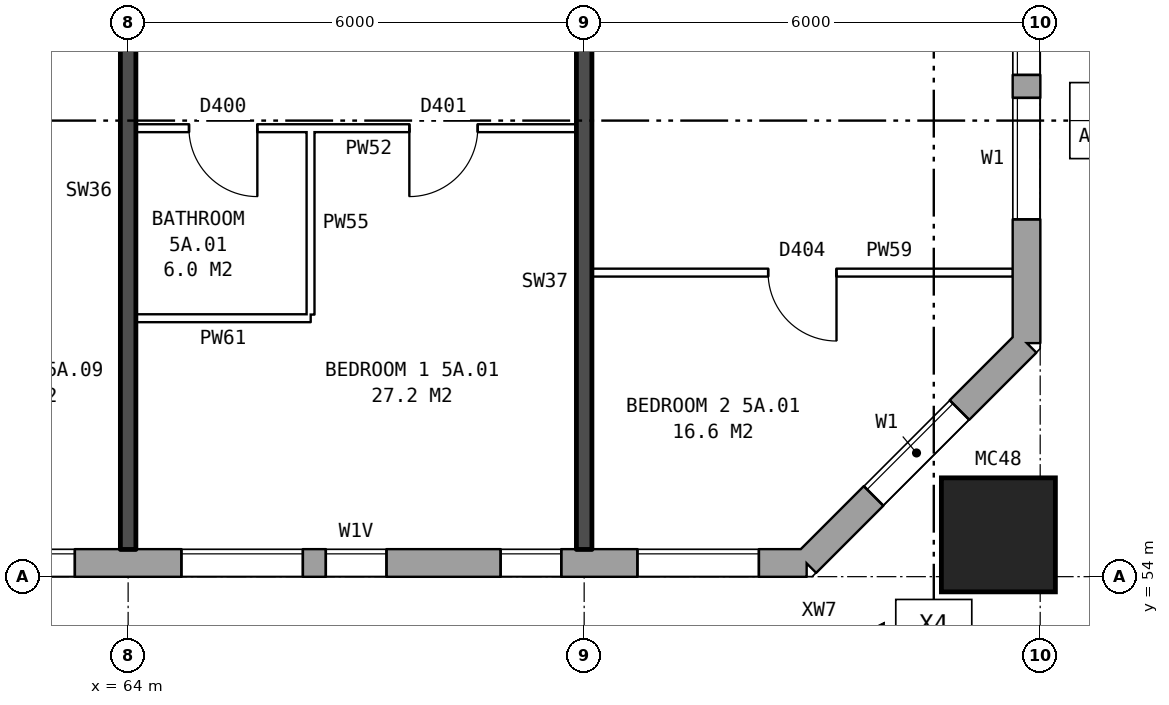
"""IFC4 building model, lengths in metres.
Left out: names, types, materials, properties, quantities, classifications, styles, units other than length and angle.
Written with IfcOpenShell. Run it as: python <this file> out.ifc"""

import sys

from ifc_helpers import new_model, si_unit, direction, frame, frame_2d, origin, origin_2d, place, context, subcontext, project, spatial, rectangle, hollow_rectangle, extrude, element, fill, save


model = new_model("IFC4")
c1 = context("Model", 3, precision=1e-05, world=origin(), true_north=direction((0.0, 1.0)))
c2 = subcontext(c1, "Body", "Model", "MODEL_VIEW")
j1 = project(units=[si_unit("LENGTHUNIT", "METRE"), si_unit("PLANEANGLEUNIT", "RADIAN")], contexts=[c1])
p1 = place(None, origin())
s1 = spatial("IfcSite", under=j1, at=p1, CompositionType="ELEMENT")
p2 = place(p1, origin())
s2 = spatial("IfcBuilding", under=s1, at=p2, CompositionType="ELEMENT")
p3 = place(p2, frame((0.0, 0.0, 22.6)))
s3 = spatial("IfcBuildingStorey", under=s2, at=p3, CompositionType="ELEMENT", Elevation=22.6)
p4 = place(p3, frame((75.45, 54.55, 0.0), z_axis=(0.0, 0.0, 1.0), x_axis=(1.0, 0.0, 0.0)))
e1 = element("IfcColumn", 1, at=p4, inside=s3, PredefinedType="COLUMN", context=c2, shape_type="SweptSolid", body=[
    extrude(hollow_rectangle(XDim=1.5, YDim=1.5, WallThickness=0.08, at=origin_2d()), origin(), (0.0, 0.0, 1.0), 3.1),
])
p5 = place(p3, frame((22.825, 54.18, 0.0), z_axis=(0.0, 0.0, 1.0), x_axis=(1.0, 0.0, 0.0)))
e2 = element("IfcWall", 2, at=p5, inside=s3, PredefinedType="STANDARD", context=c2, shape_type="SweptSolid", body=[
    extrude(rectangle(XDim=50.101, YDim=0.36, at=frame_2d((25.05, 0.0))), origin(), (0.0, 0.0, 1.0), 2.85),
])
p6 = place(p5, frame((0.3, 0.0, 0.8)))
e3 = element("IfcOpeningElement", 3, at=p6, cuts=e2, PredefinedType="OPENING", context=c2, shape_type="SweptSolid", body=[
    extrude(rectangle(XDim=1.4, YDim=1.8, at=frame_2d((0.7, 0.9))), frame((0.0, 0.19, 0.0), z_axis=(0.0, -1.0, 0.0), x_axis=(1.0, 0.0, 0.0)), (0.0, 0.0, 1.0), 0.38),
])
p7 = place(p5, frame((5.475, 0.0, 0.8)))
e4 = element("IfcOpeningElement", 4, at=p7, cuts=e2, PredefinedType="OPENING", context=c2, shape_type="SweptSolid", body=[
    extrude(rectangle(XDim=1.2, YDim=0.9, at=frame_2d((0.6, 0.45))), frame((0.0, 0.19, 0.0), z_axis=(0.0, -1.0, 0.0), x_axis=(1.0, 0.0, 0.0)), (0.0, 0.0, 1.0), 0.38),
])
p8 = place(p5, frame((8.875, 0.0, 0.8)))
e5 = element("IfcOpeningElement", 5, at=p8, cuts=e2, PredefinedType="OPENING", context=c2, shape_type="SweptSolid", body=[
    extrude(rectangle(XDim=1.6, YDim=1.8, at=frame_2d((0.8, 0.9))), frame((0.0, 0.19, 0.0), z_axis=(0.0, -1.0, 0.0), x_axis=(1.0, 0.0, 0.0)), (0.0, 0.0, 1.0), 0.38),
])
p9 = place(p5, frame((11.875, 0.0, 0.8)))
e6 = element("IfcOpeningElement", 6, at=p9, cuts=e2, PredefinedType="OPENING", context=c2, shape_type="SweptSolid", body=[
    extrude(rectangle(XDim=1.6, YDim=1.8, at=frame_2d((0.8, 0.9))), frame((0.0, 0.19, 0.0), z_axis=(0.0, -1.0, 0.0), x_axis=(1.0, 0.0, 0.0)), (0.0, 0.0, 1.0), 0.38),
])
p10 = place(p5, frame((14.875, 0.0, 0.8)))
e7 = element("IfcOpeningElement", 7, at=p10, cuts=e2, PredefinedType="OPENING", context=c2, shape_type="SweptSolid", body=[
    extrude(rectangle(XDim=1.6, YDim=1.8, at=frame_2d((0.8, 0.9))), frame((0.0, 0.19, 0.0), z_axis=(0.0, -1.0, 0.0), x_axis=(1.0, 0.0, 0.0)), (0.0, 0.0, 1.0), 0.38),
])
p11 = place(p5, frame((17.875, 0.0, 0.8)))
e8 = element("IfcOpeningElement", 8, at=p11, cuts=e2, PredefinedType="OPENING", context=c2, shape_type="SweptSolid", body=[
    extrude(rectangle(XDim=1.6, YDim=1.8, at=frame_2d((0.8, 0.9))), frame((0.0, 0.19, 0.0), z_axis=(0.0, -1.0, 0.0), x_axis=(1.0, 0.0, 0.0)), (0.0, 0.0, 1.0), 0.38),
])
p12 = place(p5, frame((20.875, 0.0, 0.8)))
e9 = element("IfcOpeningElement", 9, at=p12, cuts=e2, PredefinedType="OPENING", context=c2, shape_type="SweptSolid", body=[
    extrude(rectangle(XDim=1.6, YDim=1.8, at=frame_2d((0.8, 0.9))), frame((0.0, 0.19, 0.0), z_axis=(0.0, -1.0, 0.0), x_axis=(1.0, 0.0, 0.0)), (0.0, 0.0, 1.0), 0.38),
])
p13 = place(p5, frame((23.875, 0.0, 0.8)))
e10 = element("IfcOpeningElement", 10, at=p13, cuts=e2, PredefinedType="OPENING", context=c2, shape_type="SweptSolid", body=[
    extrude(rectangle(XDim=1.6, YDim=1.8, at=frame_2d((0.8, 0.9))), frame((0.0, 0.19, 0.0), z_axis=(0.0, -1.0, 0.0), x_axis=(1.0, 0.0, 0.0)), (0.0, 0.0, 1.0), 0.38),
])
p14 = place(p5, frame((26.875, 0.0, 0.8)))
e11 = element("IfcOpeningElement", 11, at=p14, cuts=e2, PredefinedType="OPENING", context=c2, shape_type="SweptSolid", body=[
    extrude(rectangle(XDim=1.6, YDim=1.8, at=frame_2d((0.8, 0.9))), frame((0.0, 0.19, 0.0), z_axis=(0.0, -1.0, 0.0), x_axis=(1.0, 0.0, 0.0)), (0.0, 0.0, 1.0), 0.38),
])
p15 = place(p5, frame((29.875, 0.0, 0.8)))
e12 = element("IfcOpeningElement", 12, at=p15, cuts=e2, PredefinedType="OPENING", context=c2, shape_type="SweptSolid", body=[
    extrude(rectangle(XDim=1.6, YDim=1.8, at=frame_2d((0.8, 0.9))), frame((0.0, 0.19, 0.0), z_axis=(0.0, -1.0, 0.0), x_axis=(1.0, 0.0, 0.0)), (0.0, 0.0, 1.0), 0.38),
])
p16 = place(p5, frame((32.875, 0.0, 0.8)))
e13 = element("IfcOpeningElement", 13, at=p16, cuts=e2, PredefinedType="OPENING", context=c2, shape_type="SweptSolid", body=[
    extrude(rectangle(XDim=1.6, YDim=1.8, at=frame_2d((0.8, 0.9))), frame((0.0, 0.19, 0.0), z_axis=(0.0, -1.0, 0.0), x_axis=(1.0, 0.0, 0.0)), (0.0, 0.0, 1.0), 0.38),
])
p17 = place(p5, frame((35.875, 0.0, 0.8)))
e14 = element("IfcOpeningElement", 14, at=p17, cuts=e2, PredefinedType="OPENING", context=c2, shape_type="SweptSolid", body=[
    extrude(rectangle(XDim=1.6, YDim=1.8, at=frame_2d((0.8, 0.9))), frame((0.0, 0.19, 0.0), z_axis=(0.0, -1.0, 0.0), x_axis=(1.0, 0.0, 0.0)), (0.0, 0.0, 1.0), 0.38),
])
p18 = place(p5, frame((38.875, 0.0, 0.8)))
e15 = element("IfcOpeningElement", 15, at=p18, cuts=e2, PredefinedType="OPENING", context=c2, shape_type="SweptSolid", body=[
    extrude(rectangle(XDim=1.6, YDim=1.8, at=frame_2d((0.8, 0.9))), frame((0.0, 0.19, 0.0), z_axis=(0.0, -1.0, 0.0), x_axis=(1.0, 0.0, 0.0)), (0.0, 0.0, 1.0), 0.38),
])
p19 = place(p5, frame((41.875, 0.0, 0.8)))
e16 = element("IfcOpeningElement", 16, at=p19, cuts=e2, PredefinedType="OPENING", context=c2, shape_type="SweptSolid", body=[
    extrude(rectangle(XDim=1.6, YDim=1.8, at=frame_2d((0.8, 0.9))), frame((0.0, 0.19, 0.0), z_axis=(0.0, -1.0, 0.0), x_axis=(1.0, 0.0, 0.0)), (0.0, 0.0, 1.0), 0.38),
])
p20 = place(p5, frame((43.775, 0.0, 0.8)))
e17 = element("IfcOpeningElement", 17, at=p20, cuts=e2, PredefinedType="OPENING", context=c2, shape_type="SweptSolid", body=[
    extrude(rectangle(XDim=0.8, YDim=0.9, at=frame_2d((0.4, 0.45))), frame((0.0, 0.19, 0.0), z_axis=(0.0, -1.0, 0.0), x_axis=(1.0, 0.0, 0.0)), (0.0, 0.0, 1.0), 0.38),
])
p21 = place(p5, frame((47.875, 0.0, 0.8)))
e18 = element("IfcOpeningElement", 18, at=p21, cuts=e2, PredefinedType="OPENING", context=c2, shape_type="SweptSolid", body=[
    extrude(rectangle(XDim=1.6, YDim=1.8, at=frame_2d((0.8, 0.9))), frame((0.0, 0.19, 0.0), z_axis=(0.0, -1.0, 0.0), x_axis=(1.0, 0.0, 0.0)), (0.0, 0.0, 1.0), 0.38),
])
p22 = place(p5, frame((2.0, 0.0, 0.9)))
e19 = element("IfcOpeningElement", 19, at=p22, cuts=e2, PredefinedType="OPENING", context=c2, shape_type="SweptSolid", body=[
    extrude(rectangle(XDim=0.8, YDim=1.5, at=frame_2d((0.4, 0.75))), frame((0.0, 0.19, 0.0), z_axis=(0.0, -1.0, 0.0), x_axis=(1.0, 0.0, 0.0)), (0.0, 0.0, 1.0), 0.38),
])
p23 = place(p5, frame((6.975, 0.0, 0.8)))
e20 = element("IfcOpeningElement", 20, at=p23, cuts=e2, PredefinedType="OPENING", context=c2, shape_type="SweptSolid", body=[
    extrude(rectangle(XDim=1.4, YDim=1.8, at=frame_2d((0.7, 0.9))), frame((0.0, 0.19, 0.0), z_axis=(0.0, -1.0, 0.0), x_axis=(1.0, 0.0, 0.0)), (0.0, 0.0, 1.0), 0.38),
])
p24 = place(p5, frame((46.075, 0.0, 1.7)))
e21 = element("IfcOpeningElement", 21, at=p24, cuts=e2, PredefinedType="OPENING", context=c2, shape_type="SweptSolid", body=[
    extrude(rectangle(XDim=0.8, YDim=0.9, at=frame_2d((0.4, 0.45))), frame((0.0, 0.19, 0.0), z_axis=(0.0, -1.0, 0.0), x_axis=(1.0, 0.0, 0.0)), (0.0, 0.0, 1.0), 0.38),
])
p25 = place(p3, frame((72.925, 54.18, 0.0), z_axis=(0.0, 0.0, 1.0), x_axis=(0.707106781187, 0.707106781187, 0.0)))
e22 = element("IfcWall", 22, at=p25, inside=s3, PredefinedType="STANDARD", context=c2, shape_type="SweptSolid", body=[
    extrude(rectangle(XDim=4.094, YDim=0.36, at=frame_2d((2.047, 0.0))), origin(), (0.0, 0.0, 1.0), 2.85),
])
p26 = place(p25, frame((1.247, 0.0, 0.8)))
e23 = element("IfcOpeningElement", 23, at=p26, cuts=e22, PredefinedType="OPENING", context=c2, shape_type="SweptSolid", body=[
    extrude(rectangle(XDim=1.6, YDim=1.8, at=frame_2d((0.8, 0.9))), frame((0.0, 0.19, 0.0), z_axis=(0.0, -1.0, 0.0), x_axis=(1.0, 0.0, 0.0)), (0.0, 0.0, 1.0), 0.38),
])
p27 = place(p3, frame((75.82, 57.075, 0.0), z_axis=(0.0, 0.0, 1.0), x_axis=(0.0, 1.0, 0.0)))
e24 = element("IfcWall", 24, at=p27, inside=s3, PredefinedType="STANDARD", context=c2, shape_type="SweptSolid", body=[
    extrude(rectangle(XDim=25.851, YDim=0.36, at=frame_2d((12.925, 0.0))), origin(), (0.0, 0.0, 1.0), 2.85),
])
p28 = place(p27, frame((1.625, 0.0, 0.8)))
e25 = element("IfcOpeningElement", 25, at=p28, cuts=e24, PredefinedType="OPENING", context=c2, shape_type="SweptSolid", body=[
    extrude(rectangle(XDim=1.6, YDim=1.8, at=frame_2d((0.8, 0.9))), frame((0.0, 0.19, 0.0), z_axis=(0.0, -1.0, 0.0), x_axis=(1.0, 0.0, 0.0)), (0.0, 0.0, 1.0), 0.38),
])
p29 = place(p27, frame((3.525, 0.0, 1.7)))
e26 = element("IfcOpeningElement", 26, at=p29, cuts=e24, PredefinedType="OPENING", context=c2, shape_type="SweptSolid", body=[
    extrude(rectangle(XDim=1.4, YDim=0.9, at=frame_2d((0.7, 0.45))), frame((0.0, 0.19, 0.0), z_axis=(0.0, -1.0, 0.0), x_axis=(1.0, 0.0, 0.0)), (0.0, 0.0, 1.0), 0.38),
])
p30 = place(p27, frame((20.825, 0.0, 1.7)))
e27 = element("IfcOpeningElement", 27, at=p30, cuts=e24, PredefinedType="OPENING", context=c2, shape_type="SweptSolid", body=[
    extrude(rectangle(XDim=1.4, YDim=0.9, at=frame_2d((0.7, 0.45))), frame((0.0, 0.19, 0.0), z_axis=(0.0, -1.0, 0.0), x_axis=(1.0, 0.0, 0.0)), (0.0, 0.0, 1.0), 0.38),
])
p31 = place(p27, frame((22.625, 0.0, 0.8)))
e28 = element("IfcOpeningElement", 28, at=p31, cuts=e24, PredefinedType="OPENING", context=c2, shape_type="SweptSolid", body=[
    extrude(rectangle(XDim=1.6, YDim=1.8, at=frame_2d((0.8, 0.9))), frame((0.0, 0.19, 0.0), z_axis=(0.0, -1.0, 0.0), x_axis=(1.0, 0.0, 0.0)), (0.0, 0.0, 1.0), 0.38),
])
p32 = place(p3, frame((64.1, 57.4, 0.0), z_axis=(0.0, 0.0, 1.0), x_axis=(1.0, 0.0, 0.0)))
e29 = element("IfcWall", 29, at=p32, inside=s3, PredefinedType="PARTITIONING", context=c2, shape_type="SweptSolid", body=[
    extrude(rectangle(XDim=2.3, YDim=0.1, at=frame_2d((1.15, 0.0))), origin(), (0.0, 0.0, 1.0), 2.85),
])
p33 = place(p3, frame((70.1, 58.0, 0.0), z_axis=(0.0, 0.0, 1.0), x_axis=(1.0, 0.0, 0.0)))
e30 = element("IfcWall", 30, at=p33, inside=s3, PredefinedType="PARTITIONING", context=c2, shape_type="SweptSolid", body=[
    extrude(rectangle(XDim=5.54, YDim=0.1, at=frame_2d((2.77, 0.0))), origin(), (0.0, 0.0, 1.0), 2.85),
])
p34 = place(p33, frame((2.32, 0.0, 0.0)))
e31 = element("IfcOpeningElement", 31, at=p34, cuts=e30, PredefinedType="OPENING", context=c2, shape_type="SweptSolid", body=[
    extrude(rectangle(XDim=0.9, YDim=2.1, at=frame_2d((0.45, 1.05))), frame((0.0, 0.06, 0.0), z_axis=(0.0, -1.0, 0.0), x_axis=(1.0, 0.0, 0.0)), (0.0, 0.0, 1.0), 0.12),
])
p35 = place(p3, frame((64.1, 59.9, 0.0), z_axis=(0.0, 0.0, 1.0), x_axis=(1.0, 0.0, 0.0)))
e32 = element("IfcWall", 32, at=p35, inside=s3, PredefinedType="PARTITIONING", context=c2, shape_type="SweptSolid", body=[
    extrude(rectangle(XDim=5.8, YDim=0.1, at=frame_2d((2.9, 0.0))), origin(), (0.0, 0.0, 1.0), 2.85),
])
p36 = place(p35, frame((3.6, 0.0, 0.0)))
e33 = element("IfcOpeningElement", 33, at=p36, cuts=e32, PredefinedType="OPENING", context=c2, shape_type="SweptSolid", body=[
    extrude(rectangle(XDim=0.9, YDim=2.1, at=frame_2d((0.45, 1.05))), frame((0.0, 0.06, 0.0), z_axis=(0.0, -1.0, 0.0), x_axis=(1.0, 0.0, 0.0)), (0.0, 0.0, 1.0), 0.12),
])
p37 = place(p35, frame((0.7, 0.0, 0.0)))
e34 = element("IfcOpeningElement", 34, at=p37, cuts=e32, PredefinedType="OPENING", context=c2, shape_type="SweptSolid", body=[
    extrude(rectangle(XDim=0.9, YDim=2.1, at=frame_2d((0.45, 1.05))), frame((0.0, 0.06, 0.0), z_axis=(0.0, -1.0, 0.0), x_axis=(1.0, 0.0, 0.0)), (0.0, 0.0, 1.0), 0.12),
])
p38 = place(p3, frame((64.0, 54.36, 0.0), z_axis=(0.0, 0.0, 1.0), x_axis=(0.0, 1.0, 0.0)))
e35 = element("IfcWall", 35, at=p38, inside=s3, PredefinedType="SOLIDWALL", context=c2, shape_type="SweptSolid", body=[
    extrude(rectangle(XDim=9.44, YDim=0.2, at=frame_2d((4.72, 0.0))), origin(), (0.0, 0.0, 1.0), 2.85),
])
p39 = place(p3, frame((66.4, 57.45, 0.0), z_axis=(0.0, 0.0, 1.0), x_axis=(0.0, 1.0, 0.0)))
e36 = element("IfcWall", 36, at=p39, inside=s3, PredefinedType="PARTITIONING", context=c2, shape_type="SweptSolid", body=[
    extrude(rectangle(XDim=2.4, YDim=0.1, at=frame_2d((1.2, 0.0))), origin(), (0.0, 0.0, 1.0), 2.85),
])
p40 = place(p3, frame((70.0, 54.36, 0.0), z_axis=(0.0, 0.0, 1.0), x_axis=(0.0, 1.0, 0.0)))
e37 = element("IfcWall", 37, at=p40, inside=s3, PredefinedType="SOLIDWALL", context=c2, shape_type="SweptSolid", body=[
    extrude(rectangle(XDim=9.44, YDim=0.2, at=frame_2d((4.72, 0.0))), origin(), (0.0, 0.0, 1.0), 2.85),
])
p41 = place(p40, frame((7.04, 0.0, 0.0)))
e38 = element("IfcOpeningElement", 38, at=p41, cuts=e37, PredefinedType="OPENING", context=c2, shape_type="SweptSolid", body=[
    extrude(rectangle(XDim=0.9, YDim=2.1, at=frame_2d((0.45, 1.05))), frame((0.0, 0.11, 0.0), z_axis=(0.0, -1.0, 0.0), x_axis=(1.0, 0.0, 0.0)), (0.0, 0.0, 1.0), 0.22),
])
p42 = place(p18, origin())
e39 = element("IfcWindow", 39, at=p42, inside=s3, PartitioningType="SINGLE_PANEL", PredefinedType="WINDOW", context=c2, shape_type="SweptSolid", body=[
    extrude(rectangle(XDim=1.6, YDim=1.8, at=frame_2d((0.8, 0.9))), frame((0.0, 0.15, 0.0), z_axis=(0.0, -1.0, 0.0), x_axis=(1.0, 0.0, 0.0)), (0.0, 0.0, 1.0), 0.06),
])
fill(e15, e39)
p43 = place(p19, origin())
e40 = element("IfcWindow", 40, at=p43, inside=s3, PartitioningType="SINGLE_PANEL", PredefinedType="WINDOW", context=c2, shape_type="SweptSolid", body=[
    extrude(rectangle(XDim=1.6, YDim=1.8, at=frame_2d((0.8, 0.9))), frame((0.0, 0.15, 0.0), z_axis=(0.0, -1.0, 0.0), x_axis=(1.0, 0.0, 0.0)), (0.0, 0.0, 1.0), 0.06),
])
fill(e16, e40)
p44 = place(p20, origin())
e41 = element("IfcWindow", 41, at=p44, inside=s3, PartitioningType="SINGLE_PANEL", PredefinedType="WINDOW", context=c2, shape_type="SweptSolid", body=[
    extrude(rectangle(XDim=0.8, YDim=0.9, at=frame_2d((0.4, 0.45))), frame((0.0, 0.15, 0.0), z_axis=(0.0, -1.0, 0.0), x_axis=(1.0, 0.0, 0.0)), (0.0, 0.0, 1.0), 0.06),
])
fill(e17, e41)
p45 = place(p21, origin())
e42 = element("IfcWindow", 42, at=p45, inside=s3, PartitioningType="SINGLE_PANEL", PredefinedType="WINDOW", context=c2, shape_type="SweptSolid", body=[
    extrude(rectangle(XDim=1.6, YDim=1.8, at=frame_2d((0.8, 0.9))), frame((0.0, 0.15, 0.0), z_axis=(0.0, -1.0, 0.0), x_axis=(1.0, 0.0, 0.0)), (0.0, 0.0, 1.0), 0.06),
])
fill(e18, e42)
p46 = place(p26, origin())
e43 = element("IfcWindow", 43, at=p46, inside=s3, PartitioningType="SINGLE_PANEL", PredefinedType="WINDOW", context=c2, shape_type="SweptSolid", body=[
    extrude(rectangle(XDim=1.6, YDim=1.8, at=frame_2d((0.8, 0.9))), frame((0.0, 0.15, 0.0), z_axis=(0.0, -1.0, 0.0), x_axis=(1.0, 0.0, 0.0)), (0.0, 0.0, 1.0), 0.06),
])
fill(e23, e43)
p47 = place(p28, origin())
e44 = element("IfcWindow", 44, at=p47, inside=s3, PartitioningType="SINGLE_PANEL", PredefinedType="WINDOW", context=c2, shape_type="SweptSolid", body=[
    extrude(rectangle(XDim=1.6, YDim=1.8, at=frame_2d((0.8, 0.9))), frame((0.0, 0.15, 0.0), z_axis=(0.0, -1.0, 0.0), x_axis=(1.0, 0.0, 0.0)), (0.0, 0.0, 1.0), 0.06),
])
fill(e25, e44)
p48 = place(p29, origin())
e45 = element("IfcWindow", 45, at=p48, inside=s3, PartitioningType="SINGLE_PANEL", PredefinedType="WINDOW", context=c2, shape_type="SweptSolid", body=[
    extrude(rectangle(XDim=1.4, YDim=0.9, at=frame_2d((0.7, 0.45))), frame((0.0, 0.15, 0.0), z_axis=(0.0, -1.0, 0.0), x_axis=(1.0, 0.0, 0.0)), (0.0, 0.0, 1.0), 0.06),
])
fill(e26, e45)
p49 = place(p36, frame((0.9, 0.0, 0.0), z_axis=(0.0, 0.0, 1.0), x_axis=(-1.0, 0.0, 0.0)))
e46 = element("IfcDoor", 46, at=p49, inside=s3, OperationType="SINGLE_SWING_RIGHT", PredefinedType="DOOR", context=c2, shape_type="SweptSolid", body=[
    extrude(rectangle(XDim=0.9, YDim=2.1, at=frame_2d((0.45, 1.05))), frame((0.0, 0.025, 0.0), z_axis=(0.0, -1.0, 0.0), x_axis=(1.0, 0.0, 0.0)), (0.0, 0.0, 1.0), 0.05),
])
fill(e33, e46)
p50 = place(p34, frame((0.9, 0.0, 0.0), z_axis=(0.0, 0.0, 1.0), x_axis=(-1.0, 0.0, 0.0)))
e47 = element("IfcDoor", 47, at=p50, inside=s3, OperationType="SINGLE_SWING_LEFT", PredefinedType="DOOR", context=c2, shape_type="SweptSolid", body=[
    extrude(rectangle(XDim=0.9, YDim=2.1, at=frame_2d((0.45, 1.05))), frame((0.0, 0.025, 0.0), z_axis=(0.0, -1.0, 0.0), x_axis=(1.0, 0.0, 0.0)), (0.0, 0.0, 1.0), 0.05),
])
fill(e31, e47)
p51 = place(p37, frame((0.9, 0.0, 0.0), z_axis=(0.0, 0.0, 1.0), x_axis=(-1.0, 0.0, 0.0)))
e48 = element("IfcDoor", 48, at=p51, inside=s3, OperationType="SINGLE_SWING_LEFT", PredefinedType="DOOR", context=c2, shape_type="SweptSolid", body=[
    extrude(rectangle(XDim=0.9, YDim=2.1, at=frame_2d((0.45, 1.05))), frame((0.0, 0.025, 0.0), z_axis=(0.0, -1.0, 0.0), x_axis=(1.0, 0.0, 0.0)), (0.0, 0.0, 1.0), 0.05),
])
fill(e34, e48)
p52 = place(p24, origin())
e49 = element("IfcWindow", 49, at=p52, inside=s3, PartitioningType="SINGLE_PANEL", PredefinedType="WINDOW", context=c2, shape_type="SweptSolid", body=[
    extrude(rectangle(XDim=0.8, YDim=0.9, at=frame_2d((0.4, 0.45))), frame((0.0, 0.15, 0.0), z_axis=(0.0, -1.0, 0.0), x_axis=(1.0, 0.0, 0.0)), (0.0, 0.0, 1.0), 0.06),
])
fill(e21, e49)
save(model, sys.argv[1])
